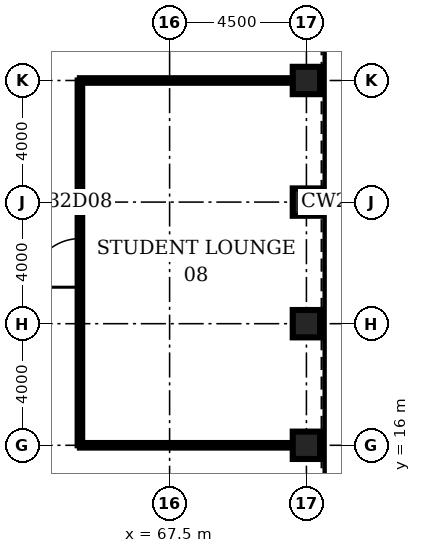
"""IFC4 building model, lengths in metres.
Left out: names, types, materials, properties, quantities, classifications, styles, units other than length and angle.
Written with IfcOpenShell. Run it as: python <this file> out.ifc"""

import sys

from ifc_helpers import new_model, si_unit, direction, frame, frame_2d, origin, origin_2d, place, context, subcontext, project, spatial, rectangle, hollow_rectangle, extrude, element, fill, save


model = new_model("IFC4")
c1 = context("Model", 3, precision=1e-05, world=origin(), true_north=direction((0.0, 1.0)))
c2 = subcontext(c1, "Body", "Model", "MODEL_VIEW")
j1 = project(units=[si_unit("LENGTHUNIT", "METRE"), si_unit("PLANEANGLEUNIT", "RADIAN")], contexts=[c1])
p1 = place(None, origin())
s1 = spatial("IfcSite", under=j1, at=p1, CompositionType="ELEMENT")
p2 = place(p1, origin())
s2 = spatial("IfcBuilding", under=s1, at=p2, CompositionType="ELEMENT")
p3 = place(p2, frame((0.0, 0.0, 146.7)))
s3 = spatial("IfcBuildingStorey", under=s2, at=p3, CompositionType="ELEMENT", Elevation=146.7)
for number, where, z_axis, x_axis in (
    (1, (72.0, 16.0, 0.0), (0.0, 0.0, 1.0), (1.0, 0.0, 0.0)),
    (2, (72.0, 20.0, 0.0), (0.0, 0.0, 1.0), (1.0, 0.0, 0.0)),
    (3, (72.0, 24.0, 0.0), (0.0, 0.0, 1.0), (1.0, 0.0, 0.0)),
    (4, (72.0, 28.0, 0.0), (0.0, 0.0, 1.0), (1.0, 0.0, 0.0)),
):
    element("IfcColumn", number, at=place(p3, frame(where, z_axis=z_axis, x_axis=x_axis)), inside=s3, PredefinedType="COLUMN", context=c2, shape_type="SweptSolid", body=[
        extrude(hollow_rectangle(XDim=0.9, YDim=0.9, WallThickness=0.1, at=origin_2d()), origin(), (0.0, 0.0, 1.0), 4.2),
    ])
for number, where, z_axis, x_axis in (
    (5, (64.55, 16.0, 0.0), (0.0, 0.0, 1.0), (1.0, 0.0, 0.0)),
    (6, (64.55, 28.0, 0.0), (0.0, 0.0, 1.0), (1.0, 0.0, 0.0)),
):
    element("IfcWall", number, at=place(p3, frame(where, z_axis=z_axis, x_axis=x_axis)), inside=s3, PredefinedType="PARTITIONING", context=c2, shape_type="SweptSolid", body=[
        extrude(rectangle(XDim=7.0, YDim=0.15, at=frame_2d((3.5, 0.0))), origin(), (0.0, 0.0, 1.0), 3.0),
    ])
p4 = place(p3, frame((64.55, 16.0, 0.0), z_axis=(0.0, 0.0, 1.0), x_axis=(0.0, 1.0, 0.0)))
e7 = element("IfcWall", 7, at=p4, inside=s3, PredefinedType="PARTITIONING", context=c2, shape_type="SweptSolid", body=[
    extrude(rectangle(XDim=12.0, YDim=0.15, at=frame_2d((6.0, 0.0))), origin(), (0.0, 0.0, 1.0), 3.0),
])
p5 = place(p4, frame((5.2, 0.0, 0.0)))
e8 = element("IfcOpeningElement", 8, at=p5, cuts=e7, PredefinedType="OPENING", context=c2, shape_type="SweptSolid", body=[
    extrude(rectangle(XDim=1.6, YDim=2.1, at=frame_2d((0.8, 1.05))), frame((0.0, 0.085, 0.0), z_axis=(0.0, -1.0, 0.0), x_axis=(1.0, 0.0, 0.0)), (0.0, 0.0, 1.0), 0.17),
])
p6 = place(p5, origin())
e9 = element("IfcDoor", 9, at=p6, inside=s3, OperationType="SINGLE_SWING_LEFT", PredefinedType="DOOR", context=c2, shape_type="SweptSolid", body=[
    extrude(rectangle(XDim=1.6, YDim=2.1, at=frame_2d((0.8, 1.05))), frame((0.0, 0.025, 0.0), z_axis=(0.0, -1.0, 0.0), x_axis=(1.0, 0.0, 0.0)), (0.0, 0.0, 1.0), 0.05),
])
fill(e8, e9)
save(model, sys.argv[1])
